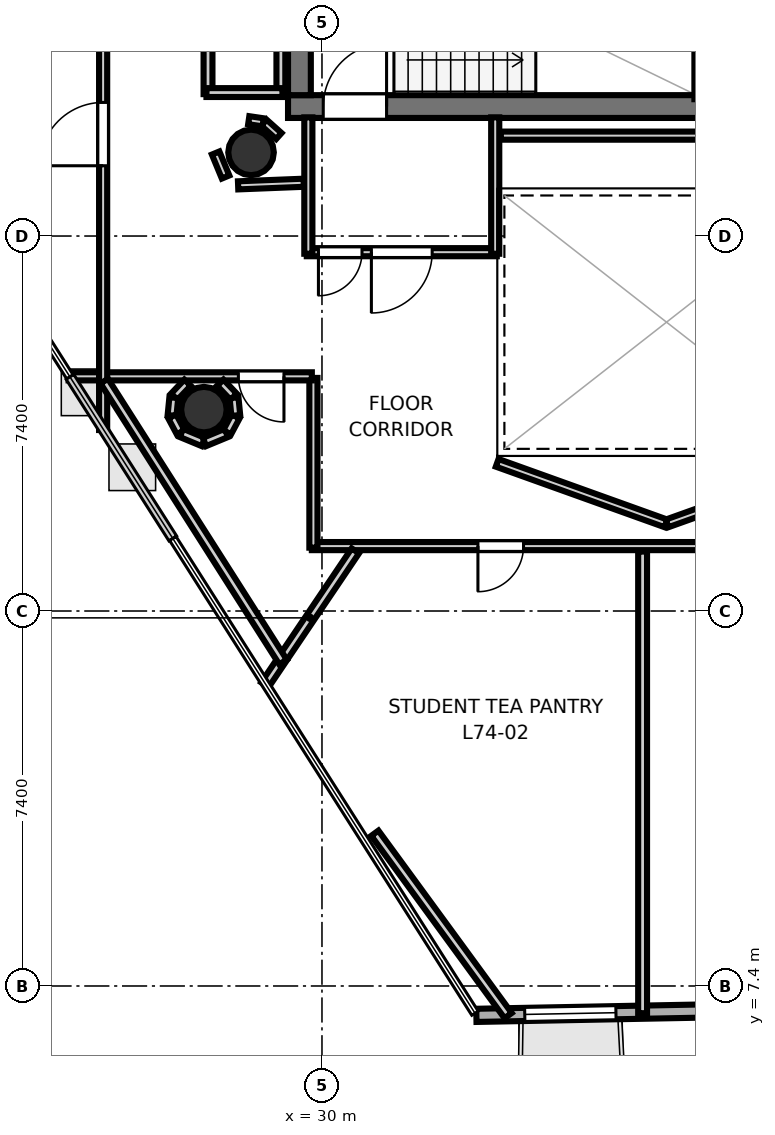
"""IFC4 building model, lengths in metres.
Left out: names, types, materials, properties, quantities, classifications, styles, units other than length and angle.
Written with IfcOpenShell. Run it as: python <this file> out.ifc"""

import sys

from ifc_helpers import new_model, si_unit, direction, frame, frame_2d, origin, origin_2d, place, context, subcontext, project, spatial, rectangle, hollow_circle, extrude, element, fill, save


model = new_model("IFC4")
c1 = context("Model", 3, precision=1e-05, world=origin(), true_north=direction((0.0, 1.0)))
c2 = subcontext(c1, "Body", "Model", "MODEL_VIEW")
j1 = project(units=[si_unit("LENGTHUNIT", "METRE"), si_unit("PLANEANGLEUNIT", "RADIAN")], contexts=[c1])
p1 = place(None, origin())
s1 = spatial("IfcSite", under=j1, at=p1, CompositionType="ELEMENT")
p2 = place(p1, origin())
s2 = spatial("IfcBuilding", under=s1, at=p2, CompositionType="ELEMENT")
p3 = place(p2, frame((0.0, 0.0, 288.0)))
s3 = spatial("IfcBuildingStorey", under=s2, at=p3, CompositionType="ELEMENT", Elevation=288.0)
p4 = place(p3, frame((29.33, 24.755, 0.0), z_axis=(0.0, 0.0, 1.0), x_axis=(1.0, 0.0, 0.0)))
e1 = element("IfcWall", 1, at=p4, inside=s3, PredefinedType="SHEAR", context=c2, shape_type="SweptSolid", body=[
    extrude(rectangle(XDim=10.52, YDim=0.45, at=frame_2d((5.26, 0.0))), origin(), (0.0, 0.0, 1.0), 3.52),
])
p5 = place(p4, frame((0.695, 0.0, 0.0)))
e2 = element("IfcOpeningElement", 2, at=p5, cuts=e1, PredefinedType="OPENING", context=c2, shape_type="SweptSolid", body=[
    extrude(rectangle(XDim=1.25, YDim=2.15, at=frame_2d((0.625, 1.075))), frame((0.0, 0.235, 0.0), z_axis=(0.0, -1.0, 0.0), x_axis=(1.0, 0.0, 0.0)), (0.0, 0.0, 1.0), 0.47),
])
p6 = place(p3, frame((29.555, 24.98, 0.0), z_axis=(0.0, 0.0, 1.0), x_axis=(0.0, 1.0, 0.0)))
e3 = element("IfcWall", 3, at=p6, inside=s3, PredefinedType="SHEAR", context=c2, shape_type="SweptSolid", body=[
    extrude(rectangle(XDim=7.44, YDim=0.45, at=frame_2d((3.72, 0.0))), origin(), (0.0, 0.0, 1.0), 3.52),
])
for number, where, z_axis, x_axis in (
    (4, (28.6, 23.85, 0.0), (0.0, 0.0, 1.0), (1.0, 0.0, 0.0)),
    (5, (27.67, 18.774, 0.0), (0.0, 0.0, 1.0), (1.0, 0.0, 0.0)),
):
    element("IfcColumn", number, at=place(p3, frame(where, z_axis=z_axis, x_axis=x_axis)), inside=s3, PredefinedType="COLUMN", context=c2, shape_type="SweptSolid", body=[
        extrude(hollow_circle(Radius=0.45, WallThickness=0.025, at=origin_2d()), origin(), (0.0, 0.0, 1.0), 3.7),
    ])
p7 = place(p3, frame((33.047, 6.82, 0.0), z_axis=(0.0, 0.0, 1.0), x_axis=(0.999816998349, 0.019130337478, 0.0)))
e6 = element("IfcWall", 6, at=p7, inside=s3, PredefinedType="SOLIDWALL", context=c2, shape_type="SweptSolid", body=[
    extrude(rectangle(XDim=4.99, YDim=0.26, at=frame_2d((2.495, 0.0))), origin(), (0.0, 0.0, 1.0), 3.52),
])
p8 = place(p7, frame((0.955, 0.0, 0.85)))
e7 = element("IfcOpeningElement", 7, at=p8, cuts=e6, PredefinedType="OPENING", context=c2, shape_type="SweptSolid", body=[
    extrude(rectangle(XDim=1.8, YDim=2.1, at=frame_2d((0.9, 1.05))), frame((0.0, 0.14, 0.0), z_axis=(0.0, -1.0, 0.0), x_axis=(1.0, 0.0, 0.0)), (0.0, 0.0, 1.0), 0.28),
])
p9 = place(p3, frame((37.45, 24.9, 0.0), z_axis=(0.0, 0.0, 1.0), x_axis=(0.0, 1.0, 0.0)))
e8 = element("IfcWall", 8, at=p9, inside=s3, PredefinedType="SOLIDWALL", context=c2, shape_type="SweptSolid", body=[
    extrude(rectangle(XDim=3.06, YDim=0.2, at=frame_2d((1.53, 0.0))), origin(), (0.0, 0.0, 1.0), 3.52),
])
p10 = place(p3, frame((33.45, 21.881, 0.0), z_axis=(0.0, 0.0, 1.0), x_axis=(-1.0, 0.0, 0.0)))
e9 = element("IfcWall", 9, at=p10, inside=s3, PredefinedType="PARTITIONING", context=c2, shape_type="SweptSolid", body=[
    extrude(rectangle(XDim=3.75, YDim=0.16, at=frame_2d((1.875, 0.0))), origin(), (0.0, 0.0, 1.0), 2.84),
])
p11 = place(p10, frame((1.275, 0.0, 0.0)))
e10 = element("IfcOpeningElement", 10, at=p11, cuts=e9, PredefinedType="OPENING", context=c2, shape_type="SweptSolid", body=[
    extrude(rectangle(XDim=1.2, YDim=2.15, at=frame_2d((0.6, 1.075))), frame((0.0, 0.09, 0.0), z_axis=(0.0, -1.0, 0.0), x_axis=(1.0, 0.0, 0.0)), (0.0, 0.0, 1.0), 0.18),
])
p12 = place(p10, frame((2.66, 0.0, 0.0)))
e11 = element("IfcOpeningElement", 11, at=p12, cuts=e9, PredefinedType="OPENING", context=c2, shape_type="SweptSolid", body=[
    extrude(rectangle(XDim=0.86, YDim=2.05, at=frame_2d((0.43, 1.025))), frame((0.0, 0.09, 0.0), z_axis=(0.0, -1.0, 0.0), x_axis=(1.0, 0.0, 0.0)), (0.0, 0.0, 1.0), 0.18),
])
for number, where, z_axis, x_axis in (
    (12, (29.731, 21.85, 0.0), (0.0, 0.0, 1.0), (0.0, 1.0, 0.0)),
    (13, (33.419, 24.542, 0.0), (0.0, 0.0, 1.0), (0.0, -1.0, 0.0)),
):
    element("IfcWall", number, at=place(p3, frame(where, z_axis=z_axis, x_axis=x_axis)), inside=s3, PredefinedType="PARTITIONING", context=c2, shape_type="SweptSolid", body=[
        extrude(rectangle(XDim=2.692, YDim=0.16, at=frame_2d((1.346, 0.0))), origin(), (0.0, 0.0, 1.0), 2.84),
    ])
p13 = place(p3, frame((27.751, 25.0, 0.0), z_axis=(0.0, 0.0, 1.0), x_axis=(0.0, 1.0, 0.0)))
e14 = element("IfcWall", 14, at=p13, inside=s3, PredefinedType="PLUMBINGWALL", context=c2, shape_type="SweptSolid", body=[
    extrude(rectangle(XDim=3.32, YDim=0.175, at=frame_2d((1.66, 0.0))), origin(), (0.0, 0.0, 1.0), 2.84),
])
p14 = place(p13, frame((1.21, 0.0, 0.0)))
e15 = element("IfcOpeningElement", 15, at=p14, cuts=e14, PredefinedType="OPENING", context=c2, shape_type="SweptSolid", body=[
    extrude(rectangle(XDim=0.9, YDim=2.1, at=frame_2d((0.45, 1.05))), frame((0.0, 0.097, 0.0), z_axis=(0.0, -1.0, 0.0), x_axis=(1.0, 0.0, 0.0)), (0.0, 0.0, 1.0), 0.195),
])
p15 = place(p3, frame((29.189, 28.32, 0.0), z_axis=(0.0, 0.0, 1.0), x_axis=(0.0, -1.0, 0.0)))
e16 = element("IfcWall", 16, at=p15, inside=s3, PredefinedType="PLUMBINGWALL", context=c2, shape_type="SweptSolid", body=[
    extrude(rectangle(XDim=3.32, YDim=0.175, at=frame_2d((1.66, 0.0))), origin(), (0.0, 0.0, 1.0), 2.84),
])
p16 = place(p3, frame((29.22, 25.031, 0.0), z_axis=(0.0, 0.0, 1.0), x_axis=(-1.0, 0.0, 0.0)))
e17 = element("IfcWall", 17, at=p16, inside=s3, PredefinedType="PLUMBINGWALL", context=c2, shape_type="SweptSolid", body=[
    extrude(rectangle(XDim=1.5, YDim=0.175, at=frame_2d((0.75, 0.0))), origin(), (0.0, 0.0, 1.0), 2.84),
])
p17 = place(p3, frame((37.872, 24.181, 0.0), z_axis=(0.0, 0.0, 1.0), x_axis=(-1.0, 0.0, 0.0)))
e18 = element("IfcWall", 18, at=p17, inside=s3, PredefinedType="PARTITIONING", context=c2, shape_type="SweptSolid", body=[
    extrude(rectangle(XDim=4.342, YDim=0.16, at=frame_2d((2.171, 0.0))), origin(), (0.0, 0.0, 1.0), 2.84),
])
p18 = place(p3, frame((29.149, 24.173, 0.0), z_axis=(0.0, 0.0, 1.0), x_axis=(-0.745225165416, 0.666812906917, 0.0)))
e19 = element("IfcWall", 19, at=p18, inside=s3, PredefinedType="PARTITIONING", context=c2, shape_type="SweptSolid", body=[
    extrude(rectangle(XDim=0.396, YDim=0.16, at=frame_2d((0.198, 0.0))), origin(), (0.0, 0.0, 1.0), 2.84),
])
p19 = place(p3, frame((28.838, 24.444, 0.0), z_axis=(0.0, 0.0, 1.0), x_axis=(-0.989449148305, 0.144880581578, 0.0)))
e20 = element("IfcWall", 20, at=p19, inside=s3, PredefinedType="PARTITIONING", context=c2, shape_type="SweptSolid", body=[
    extrude(rectangle(XDim=0.286, YDim=0.16, at=frame_2d((0.143, 0.0))), origin(), (0.0, 0.0, 1.0), 2.84),
])
p20 = place(p3, frame((27.901, 23.838, 0.0), z_axis=(0.0, 0.0, 1.0), x_axis=(0.382856448334, -0.923807847969, 0.0)))
e21 = element("IfcWall", 21, at=p20, inside=s3, PredefinedType="PARTITIONING", context=c2, shape_type="SweptSolid", body=[
    extrude(rectangle(XDim=0.513, YDim=0.16, at=frame_2d((0.256, 0.0))), origin(), (0.0, 0.0, 1.0), 2.84),
])
p21 = place(p3, frame((28.345, 23.2, 0.0), z_axis=(0.0, 0.0, 1.0), x_axis=(0.999216536924, 0.039576664043, 0.0)))
e22 = element("IfcWall", 22, at=p21, inside=s3, PredefinedType="PARTITIONING", context=c2, shape_type="SweptSolid", body=[
    extrude(rectangle(XDim=1.295, YDim=0.16, at=frame_2d((0.648, 0.0))), origin(), (0.0, 0.0, 1.0), 2.84),
])
p22 = place(p3, frame((33.458, 17.724, 0.0), z_axis=(0.0, 0.0, 1.0), x_axis=(0.94128854789, -0.337603124408, 0.0)))
e23 = element("IfcWall", 23, at=p22, inside=s3, PredefinedType="PARTITIONING", context=c2, shape_type="SweptSolid", body=[
    extrude(rectangle(XDim=3.54, YDim=0.16, at=frame_2d((1.77, 0.0))), origin(), (0.0, 0.0, 1.0), 2.84),
])
p23 = place(p3, frame((36.81, 16.529, 0.0), z_axis=(0.0, 0.0, 1.0), x_axis=(0.941548344365, 0.33687789364, 0.0)))
e24 = element("IfcWall", 24, at=p23, inside=s3, PredefinedType="PARTITIONING", context=c2, shape_type="SweptSolid", body=[
    extrude(rectangle(XDim=3.513, YDim=0.16, at=frame_2d((1.756, 0.0))), origin(), (0.0, 0.0, 1.0), 2.84),
])
p24 = place(p3, frame((44.046, 16.081, 0.0), z_axis=(0.0, 0.0, 1.0), x_axis=(-1.0, 0.0, 0.0)))
e25 = element("IfcWall", 25, at=p24, inside=s3, PredefinedType="PARTITIONING", context=c2, shape_type="SweptSolid", body=[
    extrude(rectangle(XDim=14.246, YDim=0.16, at=frame_2d((7.123, 0.0))), origin(), (0.0, 0.0, 1.0), 2.84),
])
p25 = place(p24, frame((10.069, 0.0, 0.0)))
e26 = element("IfcOpeningElement", 26, at=p25, cuts=e25, PredefinedType="OPENING", context=c2, shape_type="SweptSolid", body=[
    extrude(rectangle(XDim=0.9, YDim=2.1, at=frame_2d((0.45, 1.05))), frame((0.0, 0.09, 0.0), z_axis=(0.0, -1.0, 0.0), x_axis=(1.0, 0.0, 0.0)), (0.0, 0.0, 1.0), 0.18),
])
p26 = place(p3, frame((29.831, 16.05, 0.0), z_axis=(0.0, 0.0, 1.0), x_axis=(0.0, 1.0, 0.0)))
e27 = element("IfcWall", 27, at=p26, inside=s3, PredefinedType="PARTITIONING", context=c2, shape_type="SweptSolid", body=[
    extrude(rectangle(XDim=3.35, YDim=0.16, at=frame_2d((1.675, 0.0))), origin(), (0.0, 0.0, 1.0), 2.84),
])
p27 = place(p3, frame((29.8, 19.431, 0.0), z_axis=(0.0, 0.0, 1.0), x_axis=(-1.0, 0.0, 0.0)))
e28 = element("IfcWall", 28, at=p27, inside=s3, PredefinedType="PARTITIONING", context=c2, shape_type="SweptSolid", body=[
    extrude(rectangle(XDim=4.801, YDim=0.16, at=frame_2d((2.4, 0.0))), origin(), (0.0, 0.0, 1.0), 2.84),
])
p28 = place(p27, frame((0.55, 0.0, 0.0)))
e29 = element("IfcOpeningElement", 29, at=p28, cuts=e28, PredefinedType="OPENING", context=c2, shape_type="SweptSolid", body=[
    extrude(rectangle(XDim=0.9, YDim=2.1, at=frame_2d((0.45, 1.05))), frame((0.0, 0.09, 0.0), z_axis=(0.0, -1.0, 0.0), x_axis=(1.0, 0.0, 0.0)), (0.0, 0.0, 1.0), 0.18),
])
p29 = place(p3, frame((25.681, 18.372, 0.0), z_axis=(0.0, 0.0, 1.0), x_axis=(0.0, 1.0, 0.0)))
e30 = element("IfcWall", 30, at=p29, inside=s3, PredefinedType="PARTITIONING", context=c2, shape_type="SweptSolid", body=[
    extrude(rectangle(XDim=14.178, YDim=0.16, at=frame_2d((7.089, 0.0))), origin(), (0.0, 0.0, 1.0), 2.84),
])
p30 = place(p29, frame((11.417, 0.0, 0.0)))
e31 = element("IfcOpeningElement", 31, at=p30, cuts=e30, PredefinedType="OPENING", context=c2, shape_type="SweptSolid", body=[
    extrude(rectangle(XDim=1.25, YDim=2.2, at=frame_2d((0.625, 1.1))), frame((0.0, 0.09, 0.0), z_axis=(0.0, -1.0, 0.0), x_axis=(1.0, 0.0, 0.0)), (0.0, 0.0, 1.0), 0.18),
])
p31 = place(p29, frame((5.215, 0.0, 0.0)))
e32 = element("IfcOpeningElement", 32, at=p31, cuts=e30, PredefinedType="OPENING", context=c2, shape_type="SweptSolid", body=[
    extrude(rectangle(XDim=1.25, YDim=2.2, at=frame_2d((0.625, 1.1))), frame((0.0, 0.09, 0.0), z_axis=(0.0, -1.0, 0.0), x_axis=(1.0, 0.0, 0.0)), (0.0, 0.0, 1.0), 0.18),
])
p32 = place(p3, frame((30.658, 15.987, 0.0), z_axis=(0.0, 0.0, 1.0), x_axis=(-0.559194255482, -0.82903666061, 0.0)))
e33 = element("IfcWall", 33, at=p32, inside=s3, PredefinedType="PLUMBINGWALL", context=c2, shape_type="SweptSolid", body=[
    extrude(rectangle(XDim=3.191, YDim=0.175, at=frame_2d((1.596, 0.0))), origin(), (0.0, 0.0, 1.0), 2.84),
])
p33 = place(p3, frame((29.231, 13.794, 0.0), z_axis=(0.0, 0.0, 1.0), x_axis=(-0.5370149386, 0.843572732916, 0.0)))
e34 = element("IfcWall", 34, at=p33, inside=s3, PredefinedType="PLUMBINGWALL", context=c2, shape_type="SweptSolid", body=[
    extrude(rectangle(XDim=6.57, YDim=0.175, at=frame_2d((3.285, 0.0))), origin(), (0.0, 0.0, 1.0), 2.84),
])
p34 = place(p3, frame((27.347, 19.306, 0.0), z_axis=(0.0, 0.0, 1.0), x_axis=(-0.68932010071, -0.724456899171, 0.0)))
e35 = element("IfcWall", 35, at=p34, inside=s3, PredefinedType="PLUMBINGWALL", context=c2, shape_type="SweptSolid", body=[
    extrude(rectangle(XDim=0.382, YDim=0.175, at=frame_2d((0.191, 0.0))), origin(), (0.0, 0.0, 1.0), 2.84),
])
p35 = place(p3, frame((27.076, 19.01, 0.0), z_axis=(0.0, 0.0, 1.0), x_axis=(-0.097865889817, -0.995199611942, 0.0)))
e36 = element("IfcWall", 36, at=p35, inside=s3, PredefinedType="PLUMBINGWALL", context=c2, shape_type="SweptSolid", body=[
    extrude(rectangle(XDim=0.354, YDim=0.175, at=frame_2d((0.177, 0.0))), origin(), (0.0, 0.0, 1.0), 2.84),
])
p36 = place(p3, frame((27.044, 18.64, 0.0), z_axis=(0.0, 0.0, 1.0), x_axis=(0.471053526925, -0.882104628019, 0.0)))
e37 = element("IfcWall", 37, at=p36, inside=s3, PredefinedType="PLUMBINGWALL", context=c2, shape_type="SweptSolid", body=[
    extrude(rectangle(XDim=0.354, YDim=0.175, at=frame_2d((0.177, 0.0))), origin(), (0.0, 0.0, 1.0), 2.84),
])
for number, where, z_axis, x_axis in (
    (38, (27.227, 18.314, 0.0), (0.0, 0.0, 1.0), (0.924, -0.382, 0.0)),
    (39, (27.682, 18.135, 0.0), (0.0, 0.0, 1.0), (0.924, 0.382, 0.0)),
):
    element("IfcWall", number, at=place(p3, frame(where, z_axis=z_axis, x_axis=x_axis)), inside=s3, PredefinedType="PLUMBINGWALL", context=c2, shape_type="SweptSolid", body=[
        extrude(rectangle(XDim=0.467, YDim=0.175, at=frame_2d((0.233, 0.0))), origin(), (0.0, 0.0, 1.0), 2.84),
    ])
p37 = place(p3, frame((28.129, 18.328, 0.0), z_axis=(0.0, 0.0, 1.0), x_axis=(0.471589913721, 0.881817981942, 0.0)))
e40 = element("IfcWall", 40, at=p37, inside=s3, PredefinedType="PLUMBINGWALL", context=c2, shape_type="SweptSolid", body=[
    extrude(rectangle(XDim=0.354, YDim=0.175, at=frame_2d((0.177, 0.0))), origin(), (0.0, 0.0, 1.0), 2.84),
])
p38 = place(p3, frame((28.299, 18.658, 0.0), z_axis=(0.0, 0.0, 1.0), x_axis=(-0.097865889817, 0.995199611942, 0.0)))
e41 = element("IfcWall", 41, at=p38, inside=s3, PredefinedType="PLUMBINGWALL", context=c2, shape_type="SweptSolid", body=[
    extrude(rectangle(XDim=0.354, YDim=0.175, at=frame_2d((0.177, 0.0))), origin(), (0.0, 0.0, 1.0), 2.84),
])
p39 = place(p3, frame((28.256, 19.029, 0.0), z_axis=(0.0, 0.0, 1.0), x_axis=(-0.68932010071, 0.724456899171, 0.0)))
e42 = element("IfcWall", 42, at=p39, inside=s3, PredefinedType="PLUMBINGWALL", context=c2, shape_type="SweptSolid", body=[
    extrude(rectangle(XDim=0.382, YDim=0.175, at=frame_2d((0.191, 0.0))), origin(), (0.0, 0.0, 1.0), 2.84),
])
p40 = place(p3, frame((36.328, 15.973, 0.0), z_axis=(0.0, 0.0, 1.0), x_axis=(0.0, -1.0, 0.0)))
e43 = element("IfcWall", 43, at=p40, inside=s3, PredefinedType="PLUMBINGWALL", context=c2, shape_type="SweptSolid", body=[
    extrude(rectangle(XDim=9.11, YDim=0.175, at=frame_2d((4.555, 0.0))), origin(), (0.0, 0.0, 1.0), 2.84),
])
p41 = place(p3, frame((33.674, 6.815, 0.0), z_axis=(0.0, 0.0, 1.0), x_axis=(-0.590000113251, 0.807403162221, 0.0)))
e44 = element("IfcWall", 44, at=p41, inside=s3, PredefinedType="PLUMBINGWALL", context=c2, shape_type="SweptSolid", body=[
    extrude(rectangle(XDim=4.458, YDim=0.175, at=frame_2d((2.229, 0.0))), origin(), (0.0, 0.0, 1.0), 2.84),
])
p42 = place(p5, origin())
e45 = element("IfcDoor", 45, at=p42, inside=s3, OperationType="SINGLE_SWING_RIGHT", PredefinedType="DOOR", context=c2, shape_type="SweptSolid", body=[
    extrude(rectangle(XDim=1.25, YDim=2.15, at=frame_2d((0.625, 1.075))), frame((0.0, 0.025, 0.0), z_axis=(0.0, -1.0, 0.0), x_axis=(1.0, 0.0, 0.0)), (0.0, 0.0, 1.0), 0.05),
])
fill(e2, e45)
p43 = place(p11, origin())
e46 = element("IfcDoor", 46, at=p43, inside=s3, OperationType="SINGLE_SWING_RIGHT", PredefinedType="DOOR", context=c2, shape_type="SweptSolid", body=[
    extrude(rectangle(XDim=1.2, YDim=2.15, at=frame_2d((0.6, 1.075))), frame((0.0, 0.025, 0.0), z_axis=(0.0, -1.0, 0.0), x_axis=(1.0, 0.0, 0.0)), (0.0, 0.0, 1.0), 0.05),
])
fill(e10, e46)
p44 = place(p12, origin())
e47 = element("IfcDoor", 47, at=p44, inside=s3, OperationType="SINGLE_SWING_RIGHT", PredefinedType="DOOR", context=c2, shape_type="SweptSolid", body=[
    extrude(rectangle(XDim=0.86, YDim=2.05, at=frame_2d((0.43, 1.025))), frame((0.0, 0.025, 0.0), z_axis=(0.0, -1.0, 0.0), x_axis=(1.0, 0.0, 0.0)), (0.0, 0.0, 1.0), 0.05),
])
fill(e11, e47)
p45 = place(p28, origin())
e48 = element("IfcDoor", 48, at=p45, inside=s3, OperationType="SINGLE_SWING_LEFT", PredefinedType="DOOR", context=c2, shape_type="SweptSolid", body=[
    extrude(rectangle(XDim=0.9, YDim=2.1, at=frame_2d((0.45, 1.05))), frame((0.0, 0.025, 0.0), z_axis=(0.0, -1.0, 0.0), x_axis=(1.0, 0.0, 0.0)), (0.0, 0.0, 1.0), 0.05),
])
fill(e29, e48)
p46 = place(p25, origin())
e49 = element("IfcDoor", 49, at=p46, inside=s3, OperationType="SINGLE_SWING_RIGHT", PredefinedType="DOOR", context=c2, shape_type="SweptSolid", body=[
    extrude(rectangle(XDim=0.9, YDim=2.1, at=frame_2d((0.45, 1.05))), frame((0.0, 0.025, 0.0), z_axis=(0.0, -1.0, 0.0), x_axis=(1.0, 0.0, 0.0)), (0.0, 0.0, 1.0), 0.05),
])
fill(e26, e49)
p47 = place(p31, origin())
e50 = element("IfcDoor", 50, at=p47, inside=s3, OperationType="SINGLE_SWING_LEFT", PredefinedType="DOOR", context=c2, shape_type="SweptSolid", body=[
    extrude(rectangle(XDim=1.25, YDim=2.2, at=frame_2d((0.625, 1.1))), frame((0.0, 0.025, 0.0), z_axis=(0.0, -1.0, 0.0), x_axis=(1.0, 0.0, 0.0)), (0.0, 0.0, 1.0), 0.05),
])
fill(e32, e50)
p48 = place(p8, origin())
e51 = element("IfcWindow", 51, at=p48, inside=s3, PartitioningType="SINGLE_PANEL", PredefinedType="WINDOW", context=c2, shape_type="SweptSolid", body=[
    extrude(rectangle(XDim=1.8, YDim=2.1, at=frame_2d((0.9, 1.05))), frame((0.0, 0.03, 0.0), z_axis=(0.0, -1.0, 0.0), x_axis=(1.0, 0.0, 0.0)), (0.0, 0.0, 1.0), 0.06),
])
fill(e7, e51)
save(model, sys.argv[1])
